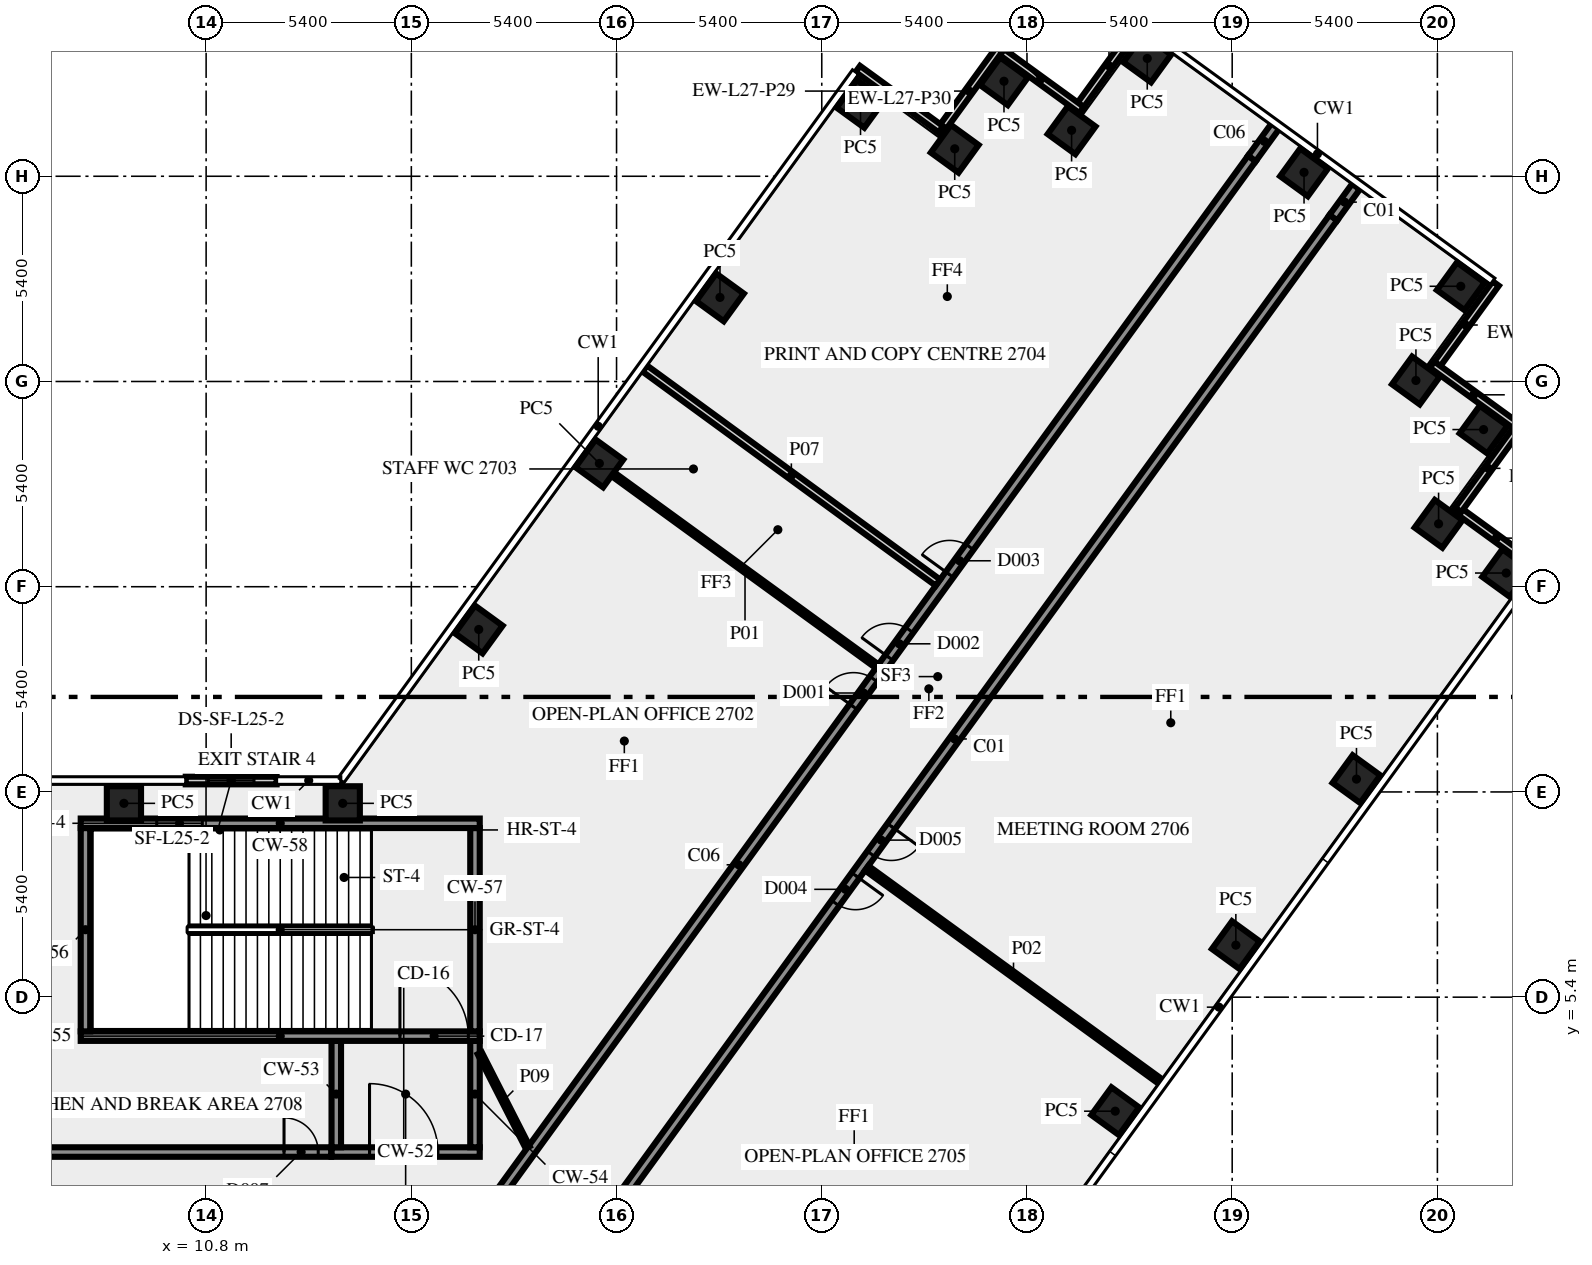
"""IFC4 building model, lengths in metres.
Left out: names, types, materials, properties, quantities, classifications, styles, units other than length and angle.
Written with IfcOpenShell. Run it as: python <this file> out.ifc"""

import sys

from ifc_helpers import new_model, si_unit, direction, frame, frame_2d, origin, origin_2d, place, context, subcontext, project, spatial, rectangle, extrude, element, fill, save


model = new_model("IFC4")
c1 = context("Model", 3, precision=1e-05, world=origin(), true_north=direction((0.0, 1.0)))
c2 = subcontext(c1, "Body", "Model", "MODEL_VIEW")
j1 = project(units=[si_unit("LENGTHUNIT", "METRE"), si_unit("PLANEANGLEUNIT", "RADIAN")], contexts=[c1])
p1 = place(None, origin())
s1 = spatial("IfcSite", under=j1, at=p1, CompositionType="ELEMENT")
p2 = place(p1, origin())
s2 = spatial("IfcBuilding", under=s1, at=p2, CompositionType="ELEMENT")
p3 = place(p2, frame((0.0, 0.0, 117.0)))
s3 = spatial("IfcBuildingStorey", under=s2, at=p3, CompositionType="ELEMENT", Elevation=117.0)
for number, where, z_axis, x_axis in (
    (1, (34.722, 2.4, 0.0), (0.0, 0.0, 1.0), (0.588, 0.809, 0.0)),
    (2, (37.896, 6.769, 0.0), (0.0, 0.0, 1.0), (0.588, 0.809, 0.0)),
    (3, (41.07, 11.137, 0.0), (0.0, 0.0, 1.0), (0.588, 0.809, 0.0)),
    (4, (45.01, 16.56, 0.0), (0.0, 0.0, 1.0), (0.588, 0.809, 0.0)),
    (5, (43.231, 17.854, 0.0), (0.0, 0.0, 1.0), (0.588, 0.809, 0.0)),
    (6, (44.415, 20.335, 0.0), (0.0, 0.0, 1.0), (0.588, 0.809, 0.0)),
    (7, (42.635, 21.626, 0.0), (0.0, 0.0, 1.0), (-0.809, 0.588, 0.0)),
    (8, (43.815, 24.105, 0.0), (0.0, 0.0, 1.0), (-0.809, 0.588, 0.0)),
    (9, (39.691, 27.102, 0.0), (0.0, 0.0, 1.0), (-0.809, 0.588, 0.0)),
    (10, (35.565, 30.1, 0.0), (0.0, 0.0, 1.0), (-0.588, -0.809, 0.0)),
    (11, (33.574, 28.209, 0.0), (0.0, 0.0, 1.0), (-0.809, 0.588, 0.0)),
    (12, (31.795, 29.5, 0.0), (0.0, 0.0, 1.0), (-0.588, -0.809, 0.0)),
    (13, (30.499, 27.723, 0.0), (0.0, 0.0, 1.0), (-0.809, 0.588, 0.0)),
    (14, (28.02, 28.905, 0.0), (0.0, 0.0, 1.0), (-0.809, 0.588, 0.0)),
    (15, (24.321, 23.812, 0.0), (0.0, 0.0, 1.0), (-0.588, -0.809, 0.0)),
    (16, (21.147, 19.444, 0.0), (0.0, 0.0, 1.0), (-0.588, -0.809, 0.0)),
    (17, (17.974, 15.075, 0.0), (0.0, 0.0, 1.0), (-0.588, -0.809, 0.0)),
    (18, (14.395, 10.5, 0.0), (0.0, 0.0, 1.0), (-1.0, 0.0, 0.0)),
    (19, (8.637, 10.5, 0.0), (0.0, 0.0, 1.0), (-1.0, 0.0, 0.0)),
):
    element("IfcColumn", number, at=place(p3, frame(where, z_axis=z_axis, x_axis=x_axis)), inside=s3, PredefinedType="COLUMN", context=c2, shape_type="SweptSolid", body=[
        extrude(rectangle(XDim=0.9, YDim=0.9, at=origin_2d()), origin(), (0.0, 0.0, 1.0), 3.65),
    ])
for number, where, z_axis, x_axis in (
    (20, (43.149, 21.994, 0.0), (0.0, 0.0, 1.0), (0.588, 0.809, 0.0)),
    (21, (35.351, 30.997, 0.0), (0.0, 0.0, 1.0), (-0.588, -0.809, 0.0)),
    (22, (33.838, 28.744, 0.0), (0.0, 0.0, 1.0), (-0.809, 0.588, 0.0)),
    (23, (31.67, 30.333, 0.0), (0.0, 0.0, 1.0), (-0.588, -0.809, 0.0)),
    (24, (30.133, 28.237, 0.0), (0.0, 0.0, 1.0), (-0.809, 0.588, 0.0)),
):
    element("IfcWall", number, at=place(p3, frame(where, z_axis=z_axis, x_axis=x_axis)), inside=s3, PredefinedType="SOLIDWALL", context=c2, shape_type="SweptSolid", body=[
        extrude(rectangle(XDim=2.7, YDim=0.2, at=frame_2d((1.35, 0.0))), origin(), (0.0, 0.0, 1.0), 3.65),
    ])
p4 = place(p3, frame((12.655, 11.1, 0.0), z_axis=(0.0, 0.0, 1.0), x_axis=(-1.0, 0.0, 0.0)))
e25 = element("IfcWall", 25, at=p4, inside=s3, PredefinedType="SOLIDWALL", context=c2, shape_type="SweptSolid", body=[
    extrude(rectangle(XDim=2.392, YDim=0.2, at=frame_2d((1.196, 0.0))), origin(), (0.0, 0.0, 1.0), 3.65),
])
p5 = place(p4, frame((0.596, 0.0, 1.0)))
e26 = element("IfcOpeningElement", 26, at=p5, cuts=e25, PredefinedType="OPENING", context=c2, shape_type="SweptSolid", body=[
    extrude(rectangle(XDim=1.2, YDim=1.2, at=frame_2d((0.6, 0.6))), frame((0.0, 0.11, 0.0), z_axis=(0.0, -1.0, 0.0), x_axis=(1.0, 0.0, 0.0)), (0.0, 0.0, 1.0), 0.22),
])
for number, where, z_axis, x_axis in (
    (27, (45.842, 16.685, 0.0), (0.0, 0.0, 1.0), (-0.809, 0.588, 0.0)),
    (28, (43.746, 18.223, 0.0), (0.0, 0.0, 1.0), (0.588, 0.809, 0.0)),
    (29, (45.245, 20.456, 0.0), (0.0, 0.0, 1.0), (-0.809, 0.588, 0.0)),
):
    element("IfcWall", number, at=place(p3, frame(where, z_axis=z_axis, x_axis=x_axis)), inside=s3, PredefinedType="SOLIDWALL", context=c2, shape_type="SweptSolid", body=[
        extrude(rectangle(XDim=2.7, YDim=0.2, at=frame_2d((1.35, 0.0))), origin(), (0.0, 0.0, 1.0), 3.65),
    ])
p6 = place(p3, frame((14.1, 1.325, 0.0), z_axis=(0.0, 0.0, 1.0), x_axis=(1.0, 0.0, 0.0)))
e30 = element("IfcWall", 30, at=p6, inside=s3, PredefinedType="SHEAR", context=c2, shape_type="SweptSolid", body=[
    extrude(rectangle(XDim=3.9, YDim=0.25, at=frame_2d((1.95, 0.0))), origin(), (0.0, 0.0, 1.0), 3.65),
])
p7 = place(p6, frame((1.0, 0.0, 0.0)))
e31 = element("IfcOpeningElement", 31, at=p7, cuts=e30, PredefinedType="OPENING", context=c2, shape_type="SweptSolid", body=[
    extrude(rectangle(XDim=1.8, YDim=2.1, at=frame_2d((0.9, 1.05))), frame((0.0, 0.135, 0.0), z_axis=(0.0, -1.0, 0.0), x_axis=(1.0, 0.0, 0.0)), (0.0, 0.0, 1.0), 0.27),
])
for number, where, z_axis, x_axis in (
    (32, (14.225, 1.45, 0.0), (0.0, 0.0, 1.0), (0.0, 1.0, 0.0)),
    (33, (17.875, 1.45, 0.0), (0.0, 0.0, 1.0), (0.0, 1.0, 0.0)),
):
    element("IfcWall", number, at=place(p3, frame(where, z_axis=z_axis, x_axis=x_axis)), inside=s3, PredefinedType="SHEAR", context=c2, shape_type="SweptSolid", body=[
        extrude(rectangle(XDim=2.8, YDim=0.25, at=frame_2d((1.4, 0.0))), origin(), (0.0, 0.0, 1.0), 3.65),
    ])
p8 = place(p3, frame((7.5, 4.375, 0.0), z_axis=(0.0, 0.0, 1.0), x_axis=(1.0, 0.0, 0.0)))
e34 = element("IfcWall", 34, at=p8, inside=s3, PredefinedType="SHEAR", context=c2, shape_type="SweptSolid", body=[
    extrude(rectangle(XDim=10.5, YDim=0.25, at=frame_2d((5.25, 0.0))), origin(), (0.0, 0.0, 1.0), 3.65),
])
p9 = place(p8, frame((8.4, 0.0, 0.0)))
e35 = element("IfcOpeningElement", 35, at=p9, cuts=e34, PredefinedType="OPENING", context=c2, shape_type="SweptSolid", body=[
    extrude(rectangle(XDim=1.8, YDim=2.1, at=frame_2d((0.9, 1.05))), frame((0.0, 0.135, 0.0), z_axis=(0.0, -1.0, 0.0), x_axis=(1.0, 0.0, 0.0)), (0.0, 0.0, 1.0), 0.27),
])
for number, where, z_axis, x_axis in (
    (36, (7.625, 4.5, 0.0), (0.0, 0.0, 1.0), (0.0, 1.0, 0.0)),
    (37, (17.875, 4.5, 0.0), (0.0, 0.0, 1.0), (0.0, 1.0, 0.0)),
):
    element("IfcWall", number, at=place(p3, frame(where, z_axis=z_axis, x_axis=x_axis)), inside=s3, PredefinedType="SHEAR", context=c2, shape_type="SweptSolid", body=[
        extrude(rectangle(XDim=5.35, YDim=0.25, at=frame_2d((2.675, 0.0))), origin(), (0.0, 0.0, 1.0), 3.65),
    ])
p10 = place(p3, frame((7.5, 9.975, 0.0), z_axis=(0.0, 0.0, 1.0), x_axis=(1.0, 0.0, 0.0)))
e38 = element("IfcWall", 38, at=p10, inside=s3, PredefinedType="SHEAR", context=c2, shape_type="SweptSolid", body=[
    extrude(rectangle(XDim=10.5, YDim=0.25, at=frame_2d((5.25, 0.0))), origin(), (0.0, 0.0, 1.0), 3.65),
])
p11 = place(p10, frame((2.0, 0.0, 1.0)))
e39 = element("IfcOpeningElement", 39, at=p11, cuts=e38, PredefinedType="OPENING", context=c2, shape_type="SweptSolid", body=[
    extrude(rectangle(XDim=1.2, YDim=1.2, at=frame_2d((0.6, 0.6))), frame((0.0, 0.135, 0.0), z_axis=(0.0, -1.0, 0.0), x_axis=(1.0, 0.0, 0.0)), (0.0, 0.0, 1.0), 0.27),
])
p12 = place(p3, frame((40.463, 25.911, 0.0), z_axis=(0.0, 0.0, 1.0), x_axis=(-0.587781654618, -0.809019608226, 0.0)))
e40 = element("IfcWall", 40, at=p12, inside=s3, PredefinedType="SOLIDWALL", context=c2, shape_type="SweptSolid", body=[
    extrude(rectangle(XDim=33.911, YDim=0.25, at=frame_2d((16.956, 0.0))), origin(), (0.0, 0.0, 1.0), 3.65),
])
p13 = place(p12, frame((21.396, 0.0, 0.0)))
e41 = element("IfcOpeningElement", 41, at=p13, cuts=e40, PredefinedType="OPENING", context=c2, shape_type="SweptSolid", body=[
    extrude(rectangle(XDim=0.9, YDim=2.1, at=frame_2d((0.45, 1.05))), frame((0.0, 0.135, 0.0), z_axis=(0.0, -1.0, 0.0), x_axis=(1.0, 0.0, 0.0)), (0.0, 0.0, 1.0), 0.27),
])
p14 = place(p12, frame((19.795, 0.0, 0.0)))
e42 = element("IfcOpeningElement", 42, at=p14, cuts=e40, PredefinedType="OPENING", context=c2, shape_type="SweptSolid", body=[
    extrude(rectangle(XDim=0.9, YDim=2.1, at=frame_2d((0.45, 1.05))), frame((0.0, 0.135, 0.0), z_axis=(0.0, -1.0, 0.0), x_axis=(1.0, 0.0, 0.0)), (0.0, 0.0, 1.0), 0.27),
])
p15 = place(p3, frame((-14.09, 1.325, 0.0), z_axis=(0.0, 0.0, 1.0), x_axis=(1.0, 0.0, 0.0)))
e43 = element("IfcWall", 43, at=p15, inside=s3, PredefinedType="SOLIDWALL", context=c2, shape_type="SweptSolid", body=[
    extrude(rectangle(XDim=28.18, YDim=0.25, at=frame_2d((14.09, 0.0))), origin(), (0.0, 0.0, 1.0), 3.65),
])
p16 = place(p15, frame((0.34, 0.0, 0.0)))
e44 = element("IfcOpeningElement", 44, at=p16, cuts=e43, PredefinedType="OPENING", context=c2, shape_type="SweptSolid", body=[
    extrude(rectangle(XDim=0.9, YDim=2.1, at=frame_2d((0.45, 1.05))), frame((0.0, 0.135, 0.0), z_axis=(0.0, -1.0, 0.0), x_axis=(1.0, 0.0, 0.0)), (0.0, 0.0, 1.0), 0.27),
])
p17 = place(p15, frame((26.94, 0.0, 0.0)))
e45 = element("IfcOpeningElement", 45, at=p17, cuts=e43, PredefinedType="OPENING", context=c2, shape_type="SweptSolid", body=[
    extrude(rectangle(XDim=0.9, YDim=2.1, at=frame_2d((0.45, 1.05))), frame((0.0, 0.135, 0.0), z_axis=(0.0, -1.0, 0.0), x_axis=(1.0, 0.0, 0.0)), (0.0, 0.0, 1.0), 0.27),
])
p18 = place(p3, frame((17.545, -1.125, 0.0), z_axis=(0.0, 0.0, 1.0), x_axis=(0.587788021768, 0.809014982226, 0.0)))
e46 = element("IfcWall", 46, at=p18, inside=s3, PredefinedType="SOLIDWALL", context=c2, shape_type="SweptSolid", body=[
    extrude(rectangle(XDim=35.344, YDim=0.25, at=frame_2d((17.672, 0.0))), origin(), (0.0, 0.0, 1.0), 3.65),
])
p19 = place(p18, frame((17.508, 0.0, 0.0)))
e47 = element("IfcOpeningElement", 47, at=p19, cuts=e46, PredefinedType="OPENING", context=c2, shape_type="SweptSolid", body=[
    extrude(rectangle(XDim=0.9, YDim=2.1, at=frame_2d((0.45, 1.05))), frame((0.0, 0.135, 0.0), z_axis=(0.0, -1.0, 0.0), x_axis=(1.0, 0.0, 0.0)), (0.0, 0.0, 1.0), 0.27),
])
p20 = place(p18, frame((21.808, 0.0, 0.0)))
e48 = element("IfcOpeningElement", 48, at=p20, cuts=e46, PredefinedType="OPENING", context=c2, shape_type="SweptSolid", body=[
    extrude(rectangle(XDim=0.9, YDim=2.1, at=frame_2d((0.45, 1.05))), frame((0.0, 0.135, 0.0), z_axis=(0.0, -1.0, 0.0), x_axis=(1.0, 0.0, 0.0)), (0.0, 0.0, 1.0), 0.27),
])
p21 = place(p18, frame((19.108, 0.0, 0.0)))
e49 = element("IfcOpeningElement", 49, at=p21, cuts=e46, PredefinedType="OPENING", context=c2, shape_type="SweptSolid", body=[
    extrude(rectangle(XDim=0.9, YDim=2.1, at=frame_2d((0.45, 1.05))), frame((0.0, 0.135, 0.0), z_axis=(0.0, -1.0, 0.0), x_axis=(1.0, 0.0, 0.0)), (0.0, 0.0, 1.0), 0.27),
])
p22 = place(p3, frame((28.457, 14.108, 0.0), z_axis=(0.0, 0.0, 1.0), x_axis=(-0.808998863664, 0.587810206266, 0.0)))
e50 = element("IfcWall", 50, at=p22, inside=s3, PredefinedType="PARTITIONING", context=c2, shape_type="SweptSolid", body=[
    extrude(rectangle(XDim=8.595, YDim=0.12, at=frame_2d((4.297, 0.0))), origin(), (0.0, 0.0, 1.0), 3.65),
])
p23 = place(p3, frame((35.909, 3.183, 0.0), z_axis=(0.0, 0.0, 1.0), x_axis=(-0.809045492695, 0.587746025721, 0.0)))
e51 = element("IfcWall", 51, at=p23, inside=s3, PredefinedType="PARTITIONING", context=c2, shape_type="SweptSolid", body=[
    extrude(rectangle(XDim=9.551, YDim=0.15, at=frame_2d((4.775, 0.0))), origin(), (0.0, 0.0, 1.0), 2.75),
])
p24 = place(p3, frame((22.344, 21.94, 0.0), z_axis=(0.0, 0.0, 1.0), x_axis=(0.807610282865, -0.589716568371, 0.0)))
e52 = element("IfcWall", 52, at=p24, inside=s3, PredefinedType="SOLIDWALL", context=c2, shape_type="SweptSolid", body=[
    extrude(rectangle(XDim=9.55, YDim=0.2, at=frame_2d((4.775, 0.0))), origin(), (0.0, 0.0, 1.0), 2.75),
])
p25 = place(p3, frame((18.0, 3.925, 0.0), z_axis=(0.0, 0.0, 1.0), x_axis=(0.453950796792, -0.891026752736, 0.0)))
e53 = element("IfcWall", 53, at=p25, inside=s3, PredefinedType="PARTITIONING", context=c2, shape_type="SweptSolid", body=[
    extrude(rectangle(XDim=2.778, YDim=0.12, at=frame_2d((1.389, 0.0))), origin(), (0.0, 0.0, 1.0), 3.65),
])
p26 = place(p3, frame((40.463, 25.911, 0.0), z_axis=(0.0, 0.0, 1.0), x_axis=(0.587855200732, 0.808966169238, 0.0)))
e54 = element("IfcWall", 54, at=p26, inside=s3, PredefinedType="SOLIDWALL", context=c2, shape_type="SweptSolid", body=[
    extrude(rectangle(XDim=1.009, YDim=0.25, at=frame_2d((0.505, 0.0))), origin(), (0.0, 0.0, 1.0), 2.75),
])
p27 = place(p3, frame((38.32, 27.469, 0.0), z_axis=(0.0, 0.0, 1.0), x_axis=(0.587753086208, 0.809040363426, 0.0)))
e55 = element("IfcWall", 55, at=p27, inside=s3, PredefinedType="SOLIDWALL", context=c2, shape_type="SweptSolid", body=[
    extrude(rectangle(XDim=1.11, YDim=0.25, at=frame_2d((0.555, 0.0))), origin(), (0.0, 0.0, 1.0), 2.75),
])
p28 = place(p5, origin())
e56 = element("IfcWindow", 56, at=p28, inside=s3, PartitioningType="SINGLE_PANEL", PredefinedType="WINDOW", context=c2, shape_type="SweptSolid", body=[
    extrude(rectangle(XDim=1.2, YDim=1.2, at=frame_2d((0.6, 0.6))), frame((0.0, 0.03, 0.0), z_axis=(0.0, -1.0, 0.0), x_axis=(1.0, 0.0, 0.0)), (0.0, 0.0, 1.0), 0.06),
])
fill(e26, e56)
p29 = place(p7, origin())
e57 = element("IfcDoor", 57, at=p29, inside=s3, OperationType="DOUBLE_DOOR_SINGLE_SWING", PredefinedType="DOOR", context=c2, shape_type="SweptSolid", body=[
    extrude(rectangle(XDim=1.8, YDim=2.1, at=frame_2d((0.9, 1.05))), frame((0.0, 0.025, 0.0), z_axis=(0.0, -1.0, 0.0), x_axis=(1.0, 0.0, 0.0)), (0.0, 0.0, 1.0), 0.05),
])
fill(e31, e57)
p30 = place(p9, origin())
e58 = element("IfcDoor", 58, at=p30, inside=s3, OperationType="DOUBLE_DOOR_SINGLE_SWING", PredefinedType="DOOR", context=c2, shape_type="SweptSolid", body=[
    extrude(rectangle(XDim=1.8, YDim=2.1, at=frame_2d((0.9, 1.05))), frame((0.0, 0.025, 0.0), z_axis=(0.0, -1.0, 0.0), x_axis=(1.0, 0.0, 0.0)), (0.0, 0.0, 1.0), 0.05),
])
fill(e35, e58)
p31 = place(p11, origin())
e59 = element("IfcWindow", 59, at=p31, inside=s3, PartitioningType="SINGLE_PANEL", PredefinedType="WINDOW", context=c2, shape_type="SweptSolid", body=[
    extrude(rectangle(XDim=1.2, YDim=1.2, at=frame_2d((0.6, 0.6))), frame((0.0, 0.03, 0.0), z_axis=(0.0, -1.0, 0.0), x_axis=(1.0, 0.0, 0.0)), (0.0, 0.0, 1.0), 0.06),
])
fill(e39, e59)
p32 = place(p19, origin())
e60 = element("IfcDoor", 60, at=p32, inside=s3, OperationType="SINGLE_SWING_RIGHT", PredefinedType="DOOR", context=c2, shape_type="SweptSolid", body=[
    extrude(rectangle(XDim=0.9, YDim=2.1, at=frame_2d((0.45, 1.05))), frame((0.0, 0.025, 0.0), z_axis=(0.0, -1.0, 0.0), x_axis=(1.0, 0.0, 0.0)), (0.0, 0.0, 1.0), 0.05),
])
fill(e47, e60)
p33 = place(p13, origin())
e61 = element("IfcDoor", 61, at=p33, inside=s3, OperationType="SINGLE_SWING_LEFT", PredefinedType="DOOR", context=c2, shape_type="SweptSolid", body=[
    extrude(rectangle(XDim=0.9, YDim=2.1, at=frame_2d((0.45, 1.05))), frame((0.0, 0.025, 0.0), z_axis=(0.0, -1.0, 0.0), x_axis=(1.0, 0.0, 0.0)), (0.0, 0.0, 1.0), 0.05),
])
fill(e41, e61)
p34 = place(p14, origin())
e62 = element("IfcDoor", 62, at=p34, inside=s3, OperationType="SINGLE_SWING_RIGHT", PredefinedType="DOOR", context=c2, shape_type="SweptSolid", body=[
    extrude(rectangle(XDim=0.9, YDim=2.1, at=frame_2d((0.45, 1.05))), frame((0.0, 0.025, 0.0), z_axis=(0.0, -1.0, 0.0), x_axis=(1.0, 0.0, 0.0)), (0.0, 0.0, 1.0), 0.05),
])
fill(e42, e62)
p35 = place(p20, origin())
e63 = element("IfcDoor", 63, at=p35, inside=s3, OperationType="SINGLE_SWING_LEFT", PredefinedType="DOOR", context=c2, shape_type="SweptSolid", body=[
    extrude(rectangle(XDim=0.9, YDim=2.1, at=frame_2d((0.45, 1.05))), frame((0.0, 0.025, 0.0), z_axis=(0.0, -1.0, 0.0), x_axis=(1.0, 0.0, 0.0)), (0.0, 0.0, 1.0), 0.05),
])
fill(e48, e63)
p36 = place(p17, origin())
e64 = element("IfcDoor", 64, at=p36, inside=s3, OperationType="SINGLE_SWING_RIGHT", PredefinedType="DOOR", context=c2, shape_type="SweptSolid", body=[
    extrude(rectangle(XDim=0.9, YDim=2.1, at=frame_2d((0.45, 1.05))), frame((0.0, 0.025, 0.0), z_axis=(0.0, -1.0, 0.0), x_axis=(1.0, 0.0, 0.0)), (0.0, 0.0, 1.0), 0.05),
])
fill(e45, e64)
p37 = place(p21, origin())
e65 = element("IfcDoor", 65, at=p37, inside=s3, OperationType="SINGLE_SWING_LEFT", PredefinedType="DOOR", context=c2, shape_type="SweptSolid", body=[
    extrude(rectangle(XDim=0.9, YDim=2.1, at=frame_2d((0.45, 1.05))), frame((0.0, 0.025, 0.0), z_axis=(0.0, -1.0, 0.0), x_axis=(1.0, 0.0, 0.0)), (0.0, 0.0, 1.0), 0.05),
])
fill(e49, e65)
save(model, sys.argv[1])
